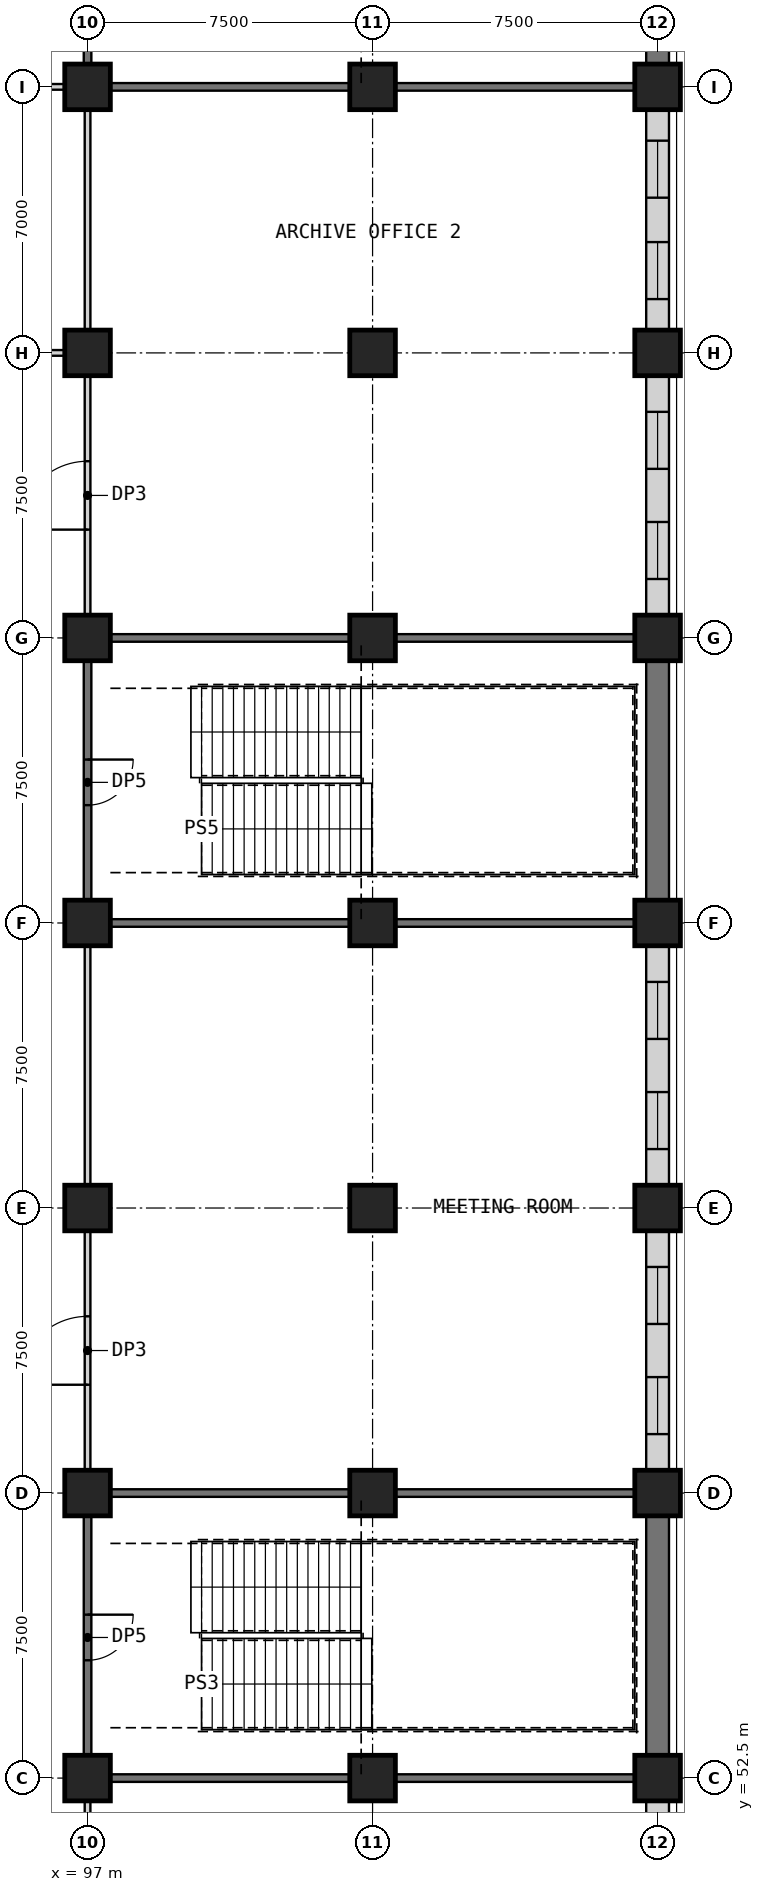
"""IFC4 building model, lengths in metres.
Left out: names, types, materials, properties, quantities, classifications, styles, units other than length and angle.
Written with IfcOpenShell. Run it as: python <this file> out.ifc"""

import sys

from ifc_helpers import new_model, si_unit, direction, frame, frame_2d, origin, origin_2d, place, context, subcontext, project, spatial, rectangle, extrude, element, fill, save


model = new_model("IFC4")
c1 = context("Model", 3, precision=1e-05, world=origin(), true_north=direction((0.0, 1.0)))
c2 = subcontext(c1, "Body", "Model", "MODEL_VIEW")
j1 = project(units=[si_unit("LENGTHUNIT", "METRE"), si_unit("PLANEANGLEUNIT", "RADIAN")], contexts=[c1])
p1 = place(None, origin())
s1 = spatial("IfcSite", under=j1, at=p1, CompositionType="ELEMENT")
p2 = place(p1, origin())
s2 = spatial("IfcBuilding", under=s1, at=p2, CompositionType="ELEMENT")
p3 = place(p2, frame((0.0, 0.0, 23.5)))
s3 = spatial("IfcBuildingStorey", under=s2, at=p3, CompositionType="ELEMENT", Elevation=23.5)
for number, where, z_axis, x_axis in (
    (1, (97.0, 52.5, 0.0), (0.0, 0.0, 1.0), (1.0, 0.0, 0.0)),
    (2, (97.0, 60.0, 0.0), (0.0, 0.0, 1.0), (1.0, 0.0, 0.0)),
    (3, (97.0, 67.5, 0.0), (0.0, 0.0, 1.0), (1.0, 0.0, 0.0)),
    (4, (97.0, 75.0, 0.0), (0.0, 0.0, 1.0), (1.0, 0.0, 0.0)),
    (5, (97.0, 82.5, 0.0), (0.0, 0.0, 1.0), (1.0, 0.0, 0.0)),
    (6, (97.0, 90.0, 0.0), (0.0, 0.0, 1.0), (1.0, 0.0, 0.0)),
    (7, (97.0, 97.0, 0.0), (0.0, 0.0, 1.0), (1.0, 0.0, 0.0)),
    (8, (104.5, 52.5, 0.0), (0.0, 0.0, 1.0), (1.0, 0.0, 0.0)),
    (9, (104.5, 60.0, 0.0), (0.0, 0.0, 1.0), (1.0, 0.0, 0.0)),
    (10, (104.5, 67.5, 0.0), (0.0, 0.0, 1.0), (1.0, 0.0, 0.0)),
    (11, (104.5, 75.0, 0.0), (0.0, 0.0, 1.0), (1.0, 0.0, 0.0)),
    (12, (104.5, 82.5, 0.0), (0.0, 0.0, 1.0), (1.0, 0.0, 0.0)),
    (13, (104.5, 90.0, 0.0), (0.0, 0.0, 1.0), (1.0, 0.0, 0.0)),
    (14, (104.5, 97.0, 0.0), (0.0, 0.0, 1.0), (1.0, 0.0, 0.0)),
    (15, (112.0, 52.5, 0.0), (0.0, 0.0, 1.0), (1.0, 0.0, 0.0)),
    (16, (112.0, 60.0, 0.0), (0.0, 0.0, 1.0), (1.0, 0.0, 0.0)),
    (17, (112.0, 67.5, 0.0), (0.0, 0.0, 1.0), (1.0, 0.0, 0.0)),
    (18, (112.0, 75.0, 0.0), (0.0, 0.0, 1.0), (1.0, 0.0, 0.0)),
    (19, (112.0, 82.5, 0.0), (0.0, 0.0, 1.0), (1.0, 0.0, 0.0)),
    (20, (112.0, 90.0, 0.0), (0.0, 0.0, 1.0), (1.0, 0.0, 0.0)),
    (21, (112.0, 97.0, 0.0), (0.0, 0.0, 1.0), (1.0, 0.0, 0.0)),
):
    element("IfcColumn", number, at=place(p3, frame(where, z_axis=z_axis, x_axis=x_axis)), inside=s3, PredefinedType="COLUMN", context=c2, shape_type="SweptSolid", body=[
        extrude(rectangle(XDim=1.2, YDim=1.2, at=origin_2d()), origin(), (0.0, 0.0, 1.0), 5.5),
    ])
p4 = place(p3, frame((90.0, 97.0, 0.0), z_axis=(0.0, 0.0, 1.0), x_axis=(1.0, 0.0, 0.0)))
e22 = element("IfcWall", 22, at=p4, inside=s3, PredefinedType="PARTITIONING", context=c2, shape_type="SweptSolid", body=[
    extrude(rectangle(XDim=6.4, YDim=0.15, at=frame_2d((3.2, 0.0))), origin(), (0.0, 0.0, 1.0), 5.2),
])
for number, where, z_axis, x_axis in (
    (23, (97.6, 97.0, 0.0), (0.0, 0.0, 1.0), (1.0, 0.0, 0.0)),
    (24, (105.1, 97.0, 0.0), (0.0, 0.0, 1.0), (1.0, 0.0, 0.0)),
    (25, (97.6, 52.5, 0.0), (0.0, 0.0, 1.0), (1.0, 0.0, 0.0)),
    (26, (105.1, 52.5, 0.0), (0.0, 0.0, 1.0), (1.0, 0.0, 0.0)),
    (27, (97.6, 60.0, 0.0), (0.0, 0.0, 1.0), (1.0, 0.0, 0.0)),
    (28, (105.1, 60.0, 0.0), (0.0, 0.0, 1.0), (1.0, 0.0, 0.0)),
    (29, (97.6, 75.0, 0.0), (0.0, 0.0, 1.0), (1.0, 0.0, 0.0)),
    (30, (105.1, 75.0, 0.0), (0.0, 0.0, 1.0), (1.0, 0.0, 0.0)),
    (31, (97.6, 82.5, 0.0), (0.0, 0.0, 1.0), (1.0, 0.0, 0.0)),
    (32, (105.1, 82.5, 0.0), (0.0, 0.0, 1.0), (1.0, 0.0, 0.0)),
):
    element("IfcWall", number, at=place(p3, frame(where, z_axis=z_axis, x_axis=x_axis)), inside=s3, PredefinedType="SHEAR", context=c2, shape_type="SweptSolid", body=[
        extrude(rectangle(XDim=6.3, YDim=0.2, at=frame_2d((3.15, 0.0))), origin(), (0.0, 0.0, 1.0), 5.2),
    ])
p5 = place(p3, frame((90.0, 90.0, 0.0), z_axis=(0.0, 0.0, 1.0), x_axis=(1.0, 0.0, 0.0)))
e33 = element("IfcWall", 33, at=p5, inside=s3, PredefinedType="PARTITIONING", context=c2, shape_type="SweptSolid", body=[
    extrude(rectangle(XDim=6.4, YDim=0.15, at=frame_2d((3.2, 0.0))), origin(), (0.0, 0.0, 1.0), 5.2),
])
p6 = place(p3, frame((97.0, 46.1, 0.0), z_axis=(0.0, 0.0, 1.0), x_axis=(0.0, 1.0, 0.0)))
e34 = element("IfcWall", 34, at=p6, inside=s3, PredefinedType="PARTITIONING", context=c2, shape_type="SweptSolid", body=[
    extrude(rectangle(XDim=5.8, YDim=0.15, at=frame_2d((2.9, 0.0))), origin(), (0.0, 0.0, 1.0), 5.2),
])
p7 = place(p6, frame((2.5, 0.0, 0.0)))
e35 = element("IfcOpeningElement", 35, at=p7, cuts=e34, PredefinedType="OPENING", context=c2, shape_type="SweptSolid", body=[
    extrude(rectangle(XDim=1.0, YDim=2.1, at=frame_2d((0.5, 1.05))), frame((0.0, 0.085, 0.0), z_axis=(0.0, -1.0, 0.0), x_axis=(1.0, 0.0, 0.0)), (0.0, 0.0, 1.0), 0.17),
])
p8 = place(p3, frame((97.0, 59.4, 0.0), z_axis=(0.0, 0.0, 1.0), x_axis=(0.0, -1.0, 0.0)))
e36 = element("IfcWall", 36, at=p8, inside=s3, PredefinedType="SHEAR", context=c2, shape_type="SweptSolid", body=[
    extrude(rectangle(XDim=6.3, YDim=0.2, at=frame_2d((3.15, 0.0))), origin(), (0.0, 0.0, 1.0), 5.2),
])
p9 = place(p8, frame((2.6, 0.0, 0.0)))
e37 = element("IfcOpeningElement", 37, at=p9, cuts=e36, PredefinedType="OPENING", context=c2, shape_type="SweptSolid", body=[
    extrude(rectangle(XDim=1.2, YDim=2.1, at=frame_2d((0.6, 1.05))), frame((0.0, 0.11, 0.0), z_axis=(0.0, -1.0, 0.0), x_axis=(1.0, 0.0, 0.0)), (0.0, 0.0, 1.0), 0.22),
])
p10 = place(p3, frame((97.0, 60.6, 0.0), z_axis=(0.0, 0.0, 1.0), x_axis=(0.0, 1.0, 0.0)))
e38 = element("IfcWall", 38, at=p10, inside=s3, PredefinedType="PARTITIONING", context=c2, shape_type="SweptSolid", body=[
    extrude(rectangle(XDim=6.3, YDim=0.15, at=frame_2d((3.15, 0.0))), origin(), (0.0, 0.0, 1.0), 5.2),
])
p11 = place(p10, frame((2.25, 0.0, 0.0)))
e39 = element("IfcOpeningElement", 39, at=p11, cuts=e38, PredefinedType="OPENING", context=c2, shape_type="SweptSolid", body=[
    extrude(rectangle(XDim=1.8, YDim=2.4, at=frame_2d((0.9, 1.2))), frame((0.0, 0.085, 0.0), z_axis=(0.0, -1.0, 0.0), x_axis=(1.0, 0.0, 0.0)), (0.0, 0.0, 1.0), 0.17),
])
p12 = place(p3, frame((97.0, 68.1, 0.0), z_axis=(0.0, 0.0, 1.0), x_axis=(0.0, 1.0, 0.0)))
e40 = element("IfcWall", 40, at=p12, inside=s3, PredefinedType="PARTITIONING", context=c2, shape_type="SweptSolid", body=[
    extrude(rectangle(XDim=6.3, YDim=0.15, at=frame_2d((3.15, 0.0))), origin(), (0.0, 0.0, 1.0), 5.2),
])
p13 = place(p3, frame((97.0, 81.9, 0.0), z_axis=(0.0, 0.0, 1.0), x_axis=(0.0, -1.0, 0.0)))
e41 = element("IfcWall", 41, at=p13, inside=s3, PredefinedType="SHEAR", context=c2, shape_type="SweptSolid", body=[
    extrude(rectangle(XDim=6.3, YDim=0.2, at=frame_2d((3.15, 0.0))), origin(), (0.0, 0.0, 1.0), 5.2),
])
p14 = place(p13, frame((2.6, 0.0, 0.0)))
e42 = element("IfcOpeningElement", 42, at=p14, cuts=e41, PredefinedType="OPENING", context=c2, shape_type="SweptSolid", body=[
    extrude(rectangle(XDim=1.2, YDim=2.1, at=frame_2d((0.6, 1.05))), frame((0.0, 0.11, 0.0), z_axis=(0.0, -1.0, 0.0), x_axis=(1.0, 0.0, 0.0)), (0.0, 0.0, 1.0), 0.22),
])
p15 = place(p3, frame((97.0, 83.1, 0.0), z_axis=(0.0, 0.0, 1.0), x_axis=(0.0, 1.0, 0.0)))
e43 = element("IfcWall", 43, at=p15, inside=s3, PredefinedType="PARTITIONING", context=c2, shape_type="SweptSolid", body=[
    extrude(rectangle(XDim=6.3, YDim=0.15, at=frame_2d((3.15, 0.0))), origin(), (0.0, 0.0, 1.0), 5.2),
])
p16 = place(p15, frame((2.25, 0.0, 0.0)))
e44 = element("IfcOpeningElement", 44, at=p16, cuts=e43, PredefinedType="OPENING", context=c2, shape_type="SweptSolid", body=[
    extrude(rectangle(XDim=1.8, YDim=2.4, at=frame_2d((0.9, 1.2))), frame((0.0, 0.085, 0.0), z_axis=(0.0, -1.0, 0.0), x_axis=(1.0, 0.0, 0.0)), (0.0, 0.0, 1.0), 0.17),
])
p17 = place(p3, frame((97.0, 90.6, 0.0), z_axis=(0.0, 0.0, 1.0), x_axis=(0.0, 1.0, 0.0)))
e45 = element("IfcWall", 45, at=p17, inside=s3, PredefinedType="PARTITIONING", context=c2, shape_type="SweptSolid", body=[
    extrude(rectangle(XDim=5.8, YDim=0.15, at=frame_2d((2.9, 0.0))), origin(), (0.0, 0.0, 1.0), 5.2),
])
p18 = place(p3, frame((97.0, 103.9, 0.0), z_axis=(0.0, 0.0, 1.0), x_axis=(0.0, -1.0, 0.0)))
e46 = element("IfcWall", 46, at=p18, inside=s3, PredefinedType="SHEAR", context=c2, shape_type="SweptSolid", body=[
    extrude(rectangle(XDim=6.3, YDim=0.2, at=frame_2d((3.15, 0.0))), origin(), (0.0, 0.0, 1.0), 5.2),
])
p19 = place(p18, frame((2.6, 0.0, 0.0)))
e47 = element("IfcOpeningElement", 47, at=p19, cuts=e46, PredefinedType="OPENING", context=c2, shape_type="SweptSolid", body=[
    extrude(rectangle(XDim=1.2, YDim=2.1, at=frame_2d((0.6, 1.05))), frame((0.0, 0.11, 0.0), z_axis=(0.0, -1.0, 0.0), x_axis=(1.0, 0.0, 0.0)), (0.0, 0.0, 1.0), 0.22),
])
p20 = place(p3, frame((112.0, 46.1, 0.0), z_axis=(0.0, 0.0, 1.0), x_axis=(0.0, 1.0, 0.0)))
e48 = element("IfcWall", 48, at=p20, inside=s3, PredefinedType="PARTITIONING", context=c2, shape_type="SweptSolid", body=[
    extrude(rectangle(XDim=5.8, YDim=0.6, at=frame_2d((2.9, 0.0))), origin(), (0.0, 0.0, 1.0), 4.6),
])
p21 = place(p20, frame((0.816, 0.0, 0.9)))
e49 = element("IfcOpeningElement", 49, at=p21, cuts=e48, PredefinedType="OPENING", context=c2, shape_type="SweptSolid", body=[
    extrude(rectangle(XDim=1.5, YDim=2.8, at=frame_2d((0.75, 1.4))), frame((0.0, 0.31, 0.0), z_axis=(0.0, -1.0, 0.0), x_axis=(1.0, 0.0, 0.0)), (0.0, 0.0, 1.0), 0.62),
])
p22 = place(p20, frame((3.484, 0.0, 0.9)))
e50 = element("IfcOpeningElement", 50, at=p22, cuts=e48, PredefinedType="OPENING", context=c2, shape_type="SweptSolid", body=[
    extrude(rectangle(XDim=1.5, YDim=2.8, at=frame_2d((0.75, 1.4))), frame((0.0, 0.31, 0.0), z_axis=(0.0, -1.0, 0.0), x_axis=(1.0, 0.0, 0.0)), (0.0, 0.0, 1.0), 0.62),
])
p23 = place(p3, frame((112.0, 53.1, 0.0), z_axis=(0.0, 0.0, 1.0), x_axis=(0.0, 1.0, 0.0)))
e51 = element("IfcWall", 51, at=p23, inside=s3, PredefinedType="PARTITIONING", context=c2, shape_type="SweptSolid", body=[
    extrude(rectangle(XDim=6.3, YDim=0.6, at=frame_2d((3.15, 0.0))), origin(), (0.0, 0.0, 1.0), 4.6),
])
p24 = place(p3, frame((112.0, 60.6, 0.0), z_axis=(0.0, 0.0, 1.0), x_axis=(0.0, 1.0, 0.0)))
e52 = element("IfcWall", 52, at=p24, inside=s3, PredefinedType="PARTITIONING", context=c2, shape_type="SweptSolid", body=[
    extrude(rectangle(XDim=6.3, YDim=0.6, at=frame_2d((3.15, 0.0))), origin(), (0.0, 0.0, 1.0), 4.6),
])
p25 = place(p24, frame((0.951, 0.0, 0.9)))
e53 = element("IfcOpeningElement", 53, at=p25, cuts=e52, PredefinedType="OPENING", context=c2, shape_type="SweptSolid", body=[
    extrude(rectangle(XDim=1.5, YDim=2.8, at=frame_2d((0.75, 1.4))), frame((0.0, 0.31, 0.0), z_axis=(0.0, -1.0, 0.0), x_axis=(1.0, 0.0, 0.0)), (0.0, 0.0, 1.0), 0.62),
])
p26 = place(p24, frame((3.849, 0.0, 0.9)))
e54 = element("IfcOpeningElement", 54, at=p26, cuts=e52, PredefinedType="OPENING", context=c2, shape_type="SweptSolid", body=[
    extrude(rectangle(XDim=1.5, YDim=2.8, at=frame_2d((0.75, 1.4))), frame((0.0, 0.31, 0.0), z_axis=(0.0, -1.0, 0.0), x_axis=(1.0, 0.0, 0.0)), (0.0, 0.0, 1.0), 0.62),
])
p27 = place(p3, frame((112.0, 68.1, 0.0), z_axis=(0.0, 0.0, 1.0), x_axis=(0.0, 1.0, 0.0)))
e55 = element("IfcWall", 55, at=p27, inside=s3, PredefinedType="PARTITIONING", context=c2, shape_type="SweptSolid", body=[
    extrude(rectangle(XDim=6.3, YDim=0.6, at=frame_2d((3.15, 0.0))), origin(), (0.0, 0.0, 1.0), 4.6),
])
p28 = place(p27, frame((0.951, 0.0, 0.9)))
e56 = element("IfcOpeningElement", 56, at=p28, cuts=e55, PredefinedType="OPENING", context=c2, shape_type="SweptSolid", body=[
    extrude(rectangle(XDim=1.5, YDim=2.8, at=frame_2d((0.75, 1.4))), frame((0.0, 0.31, 0.0), z_axis=(0.0, -1.0, 0.0), x_axis=(1.0, 0.0, 0.0)), (0.0, 0.0, 1.0), 0.62),
])
p29 = place(p27, frame((3.849, 0.0, 0.9)))
e57 = element("IfcOpeningElement", 57, at=p29, cuts=e55, PredefinedType="OPENING", context=c2, shape_type="SweptSolid", body=[
    extrude(rectangle(XDim=1.5, YDim=2.8, at=frame_2d((0.75, 1.4))), frame((0.0, 0.31, 0.0), z_axis=(0.0, -1.0, 0.0), x_axis=(1.0, 0.0, 0.0)), (0.0, 0.0, 1.0), 0.62),
])
p30 = place(p3, frame((112.0, 75.6, 0.0), z_axis=(0.0, 0.0, 1.0), x_axis=(0.0, 1.0, 0.0)))
e58 = element("IfcWall", 58, at=p30, inside=s3, PredefinedType="PARTITIONING", context=c2, shape_type="SweptSolid", body=[
    extrude(rectangle(XDim=6.3, YDim=0.6, at=frame_2d((3.15, 0.0))), origin(), (0.0, 0.0, 1.0), 4.6),
])
p31 = place(p3, frame((112.0, 83.1, 0.0), z_axis=(0.0, 0.0, 1.0), x_axis=(0.0, 1.0, 0.0)))
e59 = element("IfcWall", 59, at=p31, inside=s3, PredefinedType="PARTITIONING", context=c2, shape_type="SweptSolid", body=[
    extrude(rectangle(XDim=6.3, YDim=0.6, at=frame_2d((3.15, 0.0))), origin(), (0.0, 0.0, 1.0), 4.6),
])
p32 = place(p31, frame((0.951, 0.0, 0.9)))
e60 = element("IfcOpeningElement", 60, at=p32, cuts=e59, PredefinedType="OPENING", context=c2, shape_type="SweptSolid", body=[
    extrude(rectangle(XDim=1.5, YDim=2.8, at=frame_2d((0.75, 1.4))), frame((0.0, 0.31, 0.0), z_axis=(0.0, -1.0, 0.0), x_axis=(1.0, 0.0, 0.0)), (0.0, 0.0, 1.0), 0.62),
])
p33 = place(p31, frame((3.849, 0.0, 0.9)))
e61 = element("IfcOpeningElement", 61, at=p33, cuts=e59, PredefinedType="OPENING", context=c2, shape_type="SweptSolid", body=[
    extrude(rectangle(XDim=1.5, YDim=2.8, at=frame_2d((0.75, 1.4))), frame((0.0, 0.31, 0.0), z_axis=(0.0, -1.0, 0.0), x_axis=(1.0, 0.0, 0.0)), (0.0, 0.0, 1.0), 0.62),
])
p34 = place(p3, frame((112.0, 90.6, 0.0), z_axis=(0.0, 0.0, 1.0), x_axis=(0.0, 1.0, 0.0)))
e62 = element("IfcWall", 62, at=p34, inside=s3, PredefinedType="PARTITIONING", context=c2, shape_type="SweptSolid", body=[
    extrude(rectangle(XDim=5.8, YDim=0.6, at=frame_2d((2.9, 0.0))), origin(), (0.0, 0.0, 1.0), 4.6),
])
p35 = place(p34, frame((0.816, 0.0, 0.9)))
e63 = element("IfcOpeningElement", 63, at=p35, cuts=e62, PredefinedType="OPENING", context=c2, shape_type="SweptSolid", body=[
    extrude(rectangle(XDim=1.5, YDim=2.8, at=frame_2d((0.75, 1.4))), frame((0.0, 0.31, 0.0), z_axis=(0.0, -1.0, 0.0), x_axis=(1.0, 0.0, 0.0)), (0.0, 0.0, 1.0), 0.62),
])
p36 = place(p34, frame((3.484, 0.0, 0.9)))
e64 = element("IfcOpeningElement", 64, at=p36, cuts=e62, PredefinedType="OPENING", context=c2, shape_type="SweptSolid", body=[
    extrude(rectangle(XDim=1.5, YDim=2.8, at=frame_2d((0.75, 1.4))), frame((0.0, 0.31, 0.0), z_axis=(0.0, -1.0, 0.0), x_axis=(1.0, 0.0, 0.0)), (0.0, 0.0, 1.0), 0.62),
])
p37 = place(p3, frame((112.0, 97.6, 0.0), z_axis=(0.0, 0.0, 1.0), x_axis=(0.0, 1.0, 0.0)))
e65 = element("IfcWall", 65, at=p37, inside=s3, PredefinedType="PARTITIONING", context=c2, shape_type="SweptSolid", body=[
    extrude(rectangle(XDim=6.3, YDim=0.6, at=frame_2d((3.15, 0.0))), origin(), (0.0, 0.0, 1.0), 4.6),
])
p38 = place(p9, origin())
e66 = element("IfcDoor", 66, at=p38, inside=s3, OperationType="SINGLE_SWING_LEFT", PredefinedType="DOOR", context=c2, shape_type="SweptSolid", body=[
    extrude(rectangle(XDim=1.2, YDim=2.1, at=frame_2d((0.6, 1.05))), frame((0.0, 0.025, 0.0), z_axis=(0.0, -1.0, 0.0), x_axis=(1.0, 0.0, 0.0)), (0.0, 0.0, 1.0), 0.05),
])
fill(e37, e66)
p39 = place(p11, origin())
e67 = element("IfcDoor", 67, at=p39, inside=s3, OperationType="SINGLE_SWING_LEFT", PredefinedType="DOOR", context=c2, shape_type="SweptSolid", body=[
    extrude(rectangle(XDim=1.8, YDim=2.4, at=frame_2d((0.9, 1.2))), frame((0.0, 0.025, 0.0), z_axis=(0.0, -1.0, 0.0), x_axis=(1.0, 0.0, 0.0)), (0.0, 0.0, 1.0), 0.05),
])
fill(e39, e67)
p40 = place(p14, origin())
e68 = element("IfcDoor", 68, at=p40, inside=s3, OperationType="SINGLE_SWING_LEFT", PredefinedType="DOOR", context=c2, shape_type="SweptSolid", body=[
    extrude(rectangle(XDim=1.2, YDim=2.1, at=frame_2d((0.6, 1.05))), frame((0.0, 0.025, 0.0), z_axis=(0.0, -1.0, 0.0), x_axis=(1.0, 0.0, 0.0)), (0.0, 0.0, 1.0), 0.05),
])
fill(e42, e68)
p41 = place(p16, origin())
e69 = element("IfcDoor", 69, at=p41, inside=s3, OperationType="SINGLE_SWING_LEFT", PredefinedType="DOOR", context=c2, shape_type="SweptSolid", body=[
    extrude(rectangle(XDim=1.8, YDim=2.4, at=frame_2d((0.9, 1.2))), frame((0.0, 0.025, 0.0), z_axis=(0.0, -1.0, 0.0), x_axis=(1.0, 0.0, 0.0)), (0.0, 0.0, 1.0), 0.05),
])
fill(e44, e69)
p42 = place(p25, origin())
e70 = element("IfcWindow", 70, at=p42, inside=s3, PartitioningType="SINGLE_PANEL", PredefinedType="WINDOW", context=c2, shape_type="SweptSolid", body=[
    extrude(rectangle(XDim=1.5, YDim=2.8, at=frame_2d((0.75, 1.4))), frame((0.0, 0.03, 0.0), z_axis=(0.0, -1.0, 0.0), x_axis=(1.0, 0.0, 0.0)), (0.0, 0.0, 1.0), 0.06),
])
fill(e53, e70)
p43 = place(p26, origin())
e71 = element("IfcWindow", 71, at=p43, inside=s3, PartitioningType="SINGLE_PANEL", PredefinedType="WINDOW", context=c2, shape_type="SweptSolid", body=[
    extrude(rectangle(XDim=1.5, YDim=2.8, at=frame_2d((0.75, 1.4))), frame((0.0, 0.03, 0.0), z_axis=(0.0, -1.0, 0.0), x_axis=(1.0, 0.0, 0.0)), (0.0, 0.0, 1.0), 0.06),
])
fill(e54, e71)
p44 = place(p28, origin())
e72 = element("IfcWindow", 72, at=p44, inside=s3, PartitioningType="SINGLE_PANEL", PredefinedType="WINDOW", context=c2, shape_type="SweptSolid", body=[
    extrude(rectangle(XDim=1.5, YDim=2.8, at=frame_2d((0.75, 1.4))), frame((0.0, 0.03, 0.0), z_axis=(0.0, -1.0, 0.0), x_axis=(1.0, 0.0, 0.0)), (0.0, 0.0, 1.0), 0.06),
])
fill(e56, e72)
p45 = place(p29, origin())
e73 = element("IfcWindow", 73, at=p45, inside=s3, PartitioningType="SINGLE_PANEL", PredefinedType="WINDOW", context=c2, shape_type="SweptSolid", body=[
    extrude(rectangle(XDim=1.5, YDim=2.8, at=frame_2d((0.75, 1.4))), frame((0.0, 0.03, 0.0), z_axis=(0.0, -1.0, 0.0), x_axis=(1.0, 0.0, 0.0)), (0.0, 0.0, 1.0), 0.06),
])
fill(e57, e73)
p46 = place(p32, origin())
e74 = element("IfcWindow", 74, at=p46, inside=s3, PartitioningType="SINGLE_PANEL", PredefinedType="WINDOW", context=c2, shape_type="SweptSolid", body=[
    extrude(rectangle(XDim=1.5, YDim=2.8, at=frame_2d((0.75, 1.4))), frame((0.0, 0.03, 0.0), z_axis=(0.0, -1.0, 0.0), x_axis=(1.0, 0.0, 0.0)), (0.0, 0.0, 1.0), 0.06),
])
fill(e60, e74)
p47 = place(p33, origin())
e75 = element("IfcWindow", 75, at=p47, inside=s3, PartitioningType="SINGLE_PANEL", PredefinedType="WINDOW", context=c2, shape_type="SweptSolid", body=[
    extrude(rectangle(XDim=1.5, YDim=2.8, at=frame_2d((0.75, 1.4))), frame((0.0, 0.03, 0.0), z_axis=(0.0, -1.0, 0.0), x_axis=(1.0, 0.0, 0.0)), (0.0, 0.0, 1.0), 0.06),
])
fill(e61, e75)
p48 = place(p35, origin())
e76 = element("IfcWindow", 76, at=p48, inside=s3, PartitioningType="SINGLE_PANEL", PredefinedType="WINDOW", context=c2, shape_type="SweptSolid", body=[
    extrude(rectangle(XDim=1.5, YDim=2.8, at=frame_2d((0.75, 1.4))), frame((0.0, 0.03, 0.0), z_axis=(0.0, -1.0, 0.0), x_axis=(1.0, 0.0, 0.0)), (0.0, 0.0, 1.0), 0.06),
])
fill(e63, e76)
p49 = place(p36, origin())
e77 = element("IfcWindow", 77, at=p49, inside=s3, PartitioningType="SINGLE_PANEL", PredefinedType="WINDOW", context=c2, shape_type="SweptSolid", body=[
    extrude(rectangle(XDim=1.5, YDim=2.8, at=frame_2d((0.75, 1.4))), frame((0.0, 0.03, 0.0), z_axis=(0.0, -1.0, 0.0), x_axis=(1.0, 0.0, 0.0)), (0.0, 0.0, 1.0), 0.06),
])
fill(e64, e77)
save(model, sys.argv[1])
